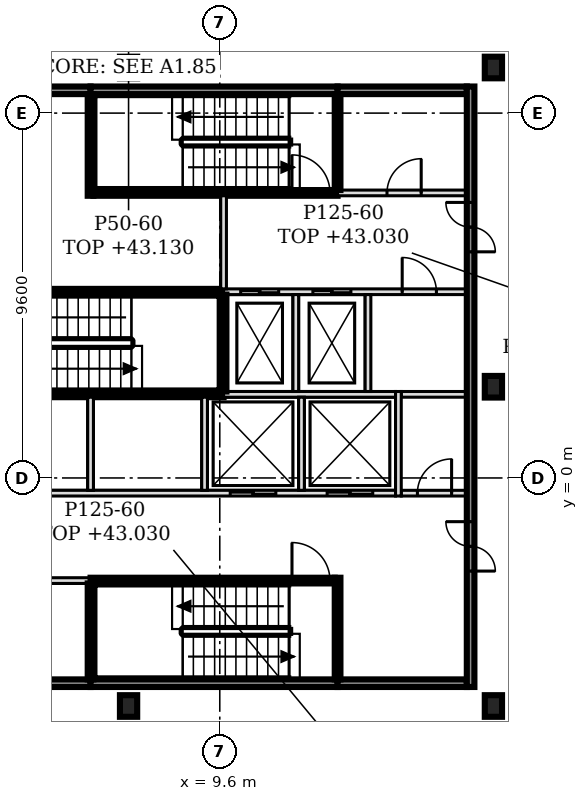
"""IFC4 building model, lengths in metres.
Left out: names, types, materials, properties, quantities, classifications, styles, units other than length and angle.
Written with IfcOpenShell. Run it as: python <this file> out.ifc"""

import sys

from ifc_helpers import new_model, si_unit, direction, frame, frame_2d, origin, origin_2d, place, context, subcontext, project, spatial, rectangle, i_section, extrude, element, fill, save


model = new_model("IFC4")
c1 = context("Model", 3, precision=1e-05, world=origin(), true_north=direction((0.0, 1.0)))
c2 = subcontext(c1, "Body", "Model", "MODEL_VIEW")
j1 = project(units=[si_unit("LENGTHUNIT", "METRE"), si_unit("PLANEANGLEUNIT", "RADIAN")], contexts=[c1])
p1 = place(None, origin())
s1 = spatial("IfcSite", under=j1, at=p1, CompositionType="ELEMENT")
p2 = place(p1, origin())
s2 = spatial("IfcBuilding", under=s1, at=p2, CompositionType="ELEMENT")
p3 = place(p2, frame((0.0, 0.0, 40.2)))
s3 = spatial("IfcBuildingStorey", under=s2, at=p3, CompositionType="ELEMENT", Elevation=40.2)
for number, where, z_axis, x_axis in (
    (1, (7.2, -6.0, -0.15), (0.0, 0.0, 1.0), (1.0, 0.0, 0.0)),
    (2, (16.8, -6.0, -0.15), (0.0, 0.0, 1.0), (1.0, 0.0, 0.0)),
    (3, (16.8, 2.4, -0.15), (0.0, 0.0, 1.0), (1.0, 0.0, 0.0)),
    (4, (7.2, 10.8, -0.15), (0.0, 0.0, 1.0), (1.0, 0.0, 0.0)),
    (5, (16.8, 10.8, -0.15), (0.0, 0.0, 1.0), (1.0, 0.0, 0.0)),
):
    element("IfcColumn", number, at=place(p3, frame(where, z_axis=z_axis, x_axis=x_axis)), inside=s3, PredefinedType="COLUMN", context=c2, shape_type="SweptSolid", body=[
        extrude(i_section(OverallWidth=0.454, OverallDepth=0.569, WebThickness=0.078, FlangeThickness=0.125, FilletRadius=0.015, at=origin_2d()), origin(), (0.0, 0.0, 1.0), 3.6),
    ])
p4 = place(p3, frame((-1.7, -5.4, 0.0), z_axis=(0.0, 0.0, 1.0), x_axis=(1.0, 0.0, 0.0)))
e6 = element("IfcWall", 6, at=p4, inside=s3, PredefinedType="SOLIDWALL", context=c2, shape_type="SweptSolid", body=[
    extrude(rectangle(XDim=7.9, YDim=0.2, at=frame_2d((3.95, 0.0))), origin(), (0.0, 0.0, 1.0), 3.45),
])
p5 = place(p3, frame((6.2, -5.4, 0.0), z_axis=(0.0, 0.0, 1.0), x_axis=(1.0, 0.0, 0.0)))
e7 = element("IfcWall", 7, at=p5, inside=s3, PredefinedType="SOLIDWALL", context=c2, shape_type="SweptSolid", body=[
    extrude(rectangle(XDim=6.5, YDim=0.2, at=frame_2d((3.25, 0.0))), origin(), (0.0, 0.0, 1.0), 3.45),
])
p6 = place(p3, frame((12.7, -5.4, 0.0), z_axis=(0.0, 0.0, 1.0), x_axis=(1.0, 0.0, 0.0)))
e8 = element("IfcWall", 8, at=p6, inside=s3, PredefinedType="SOLIDWALL", context=c2, shape_type="SweptSolid", body=[
    extrude(rectangle(XDim=3.4, YDim=0.2, at=frame_2d((1.7, 0.0))), origin(), (0.0, 0.0, 1.0), 3.45),
])
p7 = place(p3, frame((-1.7, -2.7, 0.0), z_axis=(0.0, 0.0, 1.0), x_axis=(1.0, 0.0, 0.0)))
e9 = element("IfcWall", 9, at=p7, inside=s3, PredefinedType="SOLIDWALL", context=c2, shape_type="SweptSolid", body=[
    extrude(rectangle(XDim=7.9, YDim=0.15, at=frame_2d((3.95, 0.0))), origin(), (0.0, 0.0, 1.0), 3.45),
])
p8 = place(p7, frame((0.6, 0.0, 0.0)))
e10 = element("IfcOpeningElement", 10, at=p8, cuts=e9, PredefinedType="OPENING", context=c2, shape_type="SweptSolid", body=[
    extrude(rectangle(XDim=1.1, YDim=2.1, at=frame_2d((0.55, 1.05))), frame((0.0, 0.085, 0.0), z_axis=(0.0, -1.0, 0.0), x_axis=(1.0, 0.0, 0.0)), (0.0, 0.0, 1.0), 0.17),
])
p9 = place(p7, frame((3.1, 0.0, 0.0)))
e11 = element("IfcOpeningElement", 11, at=p9, cuts=e9, PredefinedType="OPENING", context=c2, shape_type="SweptSolid", body=[
    extrude(rectangle(XDim=1.1, YDim=2.1, at=frame_2d((0.55, 1.05))), frame((0.0, 0.085, 0.0), z_axis=(0.0, -1.0, 0.0), x_axis=(1.0, 0.0, 0.0)), (0.0, 0.0, 1.0), 0.17),
])
p10 = place(p3, frame((6.2, -2.7, 0.0), z_axis=(0.0, 0.0, 1.0), x_axis=(1.0, 0.0, 0.0)))
e12 = element("IfcWall", 12, at=p10, inside=s3, PredefinedType="SOLIDWALL", context=c2, shape_type="SweptSolid", body=[
    extrude(rectangle(XDim=6.425, YDim=0.15, at=frame_2d((3.212, 0.0))), origin(), (0.0, 0.0, 1.0), 3.45),
])
p11 = place(p10, frame((5.3, 0.0, 0.0)))
e13 = element("IfcOpeningElement", 13, at=p11, cuts=e12, PredefinedType="OPENING", context=c2, shape_type="SweptSolid", body=[
    extrude(rectangle(XDim=1.0, YDim=2.1, at=frame_2d((0.5, 1.05))), frame((0.0, 0.085, 0.0), z_axis=(0.0, -1.0, 0.0), x_axis=(1.0, 0.0, 0.0)), (0.0, 0.0, 1.0), 0.17),
])
p12 = place(p3, frame((-1.7, -0.4, 0.0), z_axis=(0.0, 0.0, 1.0), x_axis=(1.0, 0.0, 0.0)))
e14 = element("IfcWall", 14, at=p12, inside=s3, PredefinedType="SOLIDWALL", context=c2, shape_type="SweptSolid", body=[
    extrude(rectangle(XDim=15.925, YDim=0.15, at=frame_2d((7.962, 0.0))), origin(), (0.0, 0.0, 1.0), 3.45),
])
p13 = place(p12, frame((0.6, 0.0, 0.0)))
e15 = element("IfcOpeningElement", 15, at=p13, cuts=e14, PredefinedType="OPENING", context=c2, shape_type="SweptSolid", body=[
    extrude(rectangle(XDim=1.1, YDim=2.1, at=frame_2d((0.55, 1.05))), frame((0.0, 0.085, 0.0), z_axis=(0.0, -1.0, 0.0), x_axis=(1.0, 0.0, 0.0)), (0.0, 0.0, 1.0), 0.17),
])
p14 = place(p12, frame((3.1, 0.0, 0.0)))
e16 = element("IfcOpeningElement", 16, at=p14, cuts=e14, PredefinedType="OPENING", context=c2, shape_type="SweptSolid", body=[
    extrude(rectangle(XDim=1.1, YDim=2.1, at=frame_2d((0.55, 1.05))), frame((0.0, 0.085, 0.0), z_axis=(0.0, -1.0, 0.0), x_axis=(1.0, 0.0, 0.0)), (0.0, 0.0, 1.0), 0.17),
])
p15 = place(p12, frame((11.575, 0.0, 0.0)))
e17 = element("IfcOpeningElement", 17, at=p15, cuts=e14, PredefinedType="OPENING", context=c2, shape_type="SweptSolid", body=[
    extrude(rectangle(XDim=1.2, YDim=2.1, at=frame_2d((0.6, 1.05))), frame((0.0, 0.085, 0.0), z_axis=(0.0, -1.0, 0.0), x_axis=(1.0, 0.0, 0.0)), (0.0, 0.0, 1.0), 0.17),
])
p16 = place(p12, frame((14.125, 0.0, 0.0)))
e18 = element("IfcOpeningElement", 18, at=p16, cuts=e14, PredefinedType="OPENING", context=c2, shape_type="SweptSolid", body=[
    extrude(rectangle(XDim=1.2, YDim=2.1, at=frame_2d((0.6, 1.05))), frame((0.0, 0.085, 0.0), z_axis=(0.0, -1.0, 0.0), x_axis=(1.0, 0.0, 0.0)), (0.0, 0.0, 1.0), 0.17),
])
p17 = place(p3, frame((14.375, -0.4, 0.0), z_axis=(0.0, 0.0, 1.0), x_axis=(1.0, 0.0, 0.0)))
e19 = element("IfcWall", 19, at=p17, inside=s3, PredefinedType="PARTITIONING", context=c2, shape_type="SweptSolid", body=[
    extrude(rectangle(XDim=1.725, YDim=0.15, at=frame_2d((0.863, 0.0))), origin(), (0.0, 0.0, 1.0), 3.45),
])
p18 = place(p17, frame((0.425, 0.0, 0.0)))
e20 = element("IfcOpeningElement", 20, at=p18, cuts=e19, PredefinedType="OPENING", context=c2, shape_type="SweptSolid", body=[
    extrude(rectangle(XDim=0.9, YDim=2.1, at=frame_2d((0.45, 1.05))), frame((0.0, 0.085, 0.0), z_axis=(0.0, -1.0, 0.0), x_axis=(1.0, 0.0, 0.0)), (0.0, 0.0, 1.0), 0.17),
])
p19 = place(p3, frame((3.2, 2.2, 0.0), z_axis=(0.0, 0.0, 1.0), x_axis=(1.0, 0.0, 0.0)))
e21 = element("IfcWall", 21, at=p19, inside=s3, PredefinedType="SOLIDWALL", context=c2, shape_type="SweptSolid", body=[
    extrude(rectangle(XDim=6.5, YDim=0.15, at=frame_2d((3.25, 0.0))), origin(), (0.0, 0.0, 1.0), 3.45),
])
p20 = place(p3, frame((9.7, 2.2, 0.0), z_axis=(0.0, 0.0, 1.0), x_axis=(1.0, 0.0, 0.0)))
e22 = element("IfcWall", 22, at=p20, inside=s3, PredefinedType="SOLIDWALL", context=c2, shape_type="SweptSolid", body=[
    extrude(rectangle(XDim=4.525, YDim=0.15, at=frame_2d((2.263, 0.0))), origin(), (0.0, 0.0, 1.0), 3.45),
])
p21 = place(p3, frame((14.375, 2.2, 0.0), z_axis=(0.0, 0.0, 1.0), x_axis=(1.0, 0.0, 0.0)))
e23 = element("IfcWall", 23, at=p21, inside=s3, PredefinedType="PARTITIONING", context=c2, shape_type="SweptSolid", body=[
    extrude(rectangle(XDim=1.725, YDim=0.15, at=frame_2d((0.863, 0.0))), origin(), (0.0, 0.0, 1.0), 3.45),
])
p22 = place(p3, frame((3.275, 4.9, 0.0), z_axis=(0.0, 0.0, 1.0), x_axis=(1.0, 0.0, 0.0)))
e24 = element("IfcWall", 24, at=p22, inside=s3, PredefinedType="SOLIDWALL", context=c2, shape_type="SweptSolid", body=[
    extrude(rectangle(XDim=6.425, YDim=0.15, at=frame_2d((3.212, 0.0))), origin(), (0.0, 0.0, 1.0), 3.45),
])
p23 = place(p22, frame((0.1, 0.0, 0.0)))
e25 = element("IfcOpeningElement", 25, at=p23, cuts=e24, PredefinedType="OPENING", context=c2, shape_type="SweptSolid", body=[
    extrude(rectangle(XDim=1.0, YDim=2.1, at=frame_2d((0.5, 1.05))), frame((0.0, 0.085, 0.0), z_axis=(0.0, -1.0, 0.0), x_axis=(1.0, 0.0, 0.0)), (0.0, 0.0, 1.0), 0.17),
])
p24 = place(p3, frame((9.7, 4.9, 0.0), z_axis=(0.0, 0.0, 1.0), x_axis=(1.0, 0.0, 0.0)))
e26 = element("IfcWall", 26, at=p24, inside=s3, PredefinedType="SOLIDWALL", context=c2, shape_type="SweptSolid", body=[
    extrude(rectangle(XDim=6.4, YDim=0.15, at=frame_2d((3.2, 0.0))), origin(), (0.0, 0.0, 1.0), 3.45),
])
p25 = place(p24, frame((0.45, 0.0, 0.0)))
e27 = element("IfcOpeningElement", 27, at=p25, cuts=e26, PredefinedType="OPENING", context=c2, shape_type="SweptSolid", body=[
    extrude(rectangle(XDim=1.0, YDim=2.1, at=frame_2d((0.5, 1.05))), frame((0.0, 0.085, 0.0), z_axis=(0.0, -1.0, 0.0), x_axis=(1.0, 0.0, 0.0)), (0.0, 0.0, 1.0), 0.17),
])
p26 = place(p24, frame((2.35, 0.0, 0.0)))
e28 = element("IfcOpeningElement", 28, at=p26, cuts=e26, PredefinedType="OPENING", context=c2, shape_type="SweptSolid", body=[
    extrude(rectangle(XDim=1.0, YDim=2.1, at=frame_2d((0.5, 1.05))), frame((0.0, 0.085, 0.0), z_axis=(0.0, -1.0, 0.0), x_axis=(1.0, 0.0, 0.0)), (0.0, 0.0, 1.0), 0.17),
])
p27 = place(p24, frame((4.7, 0.0, 0.0)))
e29 = element("IfcOpeningElement", 29, at=p27, cuts=e26, PredefinedType="OPENING", context=c2, shape_type="SweptSolid", body=[
    extrude(rectangle(XDim=0.9, YDim=2.1, at=frame_2d((0.45, 1.05))), frame((0.0, 0.085, 0.0), z_axis=(0.0, -1.0, 0.0), x_axis=(1.0, 0.0, 0.0)), (0.0, 0.0, 1.0), 0.17),
])
p28 = place(p3, frame((6.275, 7.5, 0.0), z_axis=(0.0, 0.0, 1.0), x_axis=(1.0, 0.0, 0.0)))
e30 = element("IfcWall", 30, at=p28, inside=s3, PredefinedType="SOLIDWALL", context=c2, shape_type="SweptSolid", body=[
    extrude(rectangle(XDim=6.425, YDim=0.15, at=frame_2d((3.212, 0.0))), origin(), (0.0, 0.0, 1.0), 3.45),
])
p29 = place(p28, frame((5.225, 0.0, 0.0)))
e31 = element("IfcOpeningElement", 31, at=p29, cuts=e30, PredefinedType="OPENING", context=c2, shape_type="SweptSolid", body=[
    extrude(rectangle(XDim=1.0, YDim=2.1, at=frame_2d((0.5, 1.05))), frame((0.0, 0.085, 0.0), z_axis=(0.0, -1.0, 0.0), x_axis=(1.0, 0.0, 0.0)), (0.0, 0.0, 1.0), 0.17),
])
p30 = place(p3, frame((12.7, 7.5, 0.0), z_axis=(0.0, 0.0, 1.0), x_axis=(1.0, 0.0, 0.0)))
e32 = element("IfcWall", 32, at=p30, inside=s3, PredefinedType="SOLIDWALL", context=c2, shape_type="SweptSolid", body=[
    extrude(rectangle(XDim=3.4, YDim=0.15, at=frame_2d((1.7, 0.0))), origin(), (0.0, 0.0, 1.0), 3.45),
])
p31 = place(p30, frame((1.3, 0.0, 0.0)))
e33 = element("IfcOpeningElement", 33, at=p31, cuts=e32, PredefinedType="OPENING", context=c2, shape_type="SweptSolid", body=[
    extrude(rectangle(XDim=0.9, YDim=2.1, at=frame_2d((0.45, 1.05))), frame((0.0, 0.085, 0.0), z_axis=(0.0, -1.0, 0.0), x_axis=(1.0, 0.0, 0.0)), (0.0, 0.0, 1.0), 0.17),
])
p32 = place(p3, frame((-1.7, 10.2, 0.0), z_axis=(0.0, 0.0, 1.0), x_axis=(1.0, 0.0, 0.0)))
e34 = element("IfcWall", 34, at=p32, inside=s3, PredefinedType="SOLIDWALL", context=c2, shape_type="SweptSolid", body=[
    extrude(rectangle(XDim=7.9, YDim=0.2, at=frame_2d((3.95, 0.0))), origin(), (0.0, 0.0, 1.0), 3.45),
])
p33 = place(p3, frame((6.2, 10.2, 0.0), z_axis=(0.0, 0.0, 1.0), x_axis=(1.0, 0.0, 0.0)))
e35 = element("IfcWall", 35, at=p33, inside=s3, PredefinedType="SOLIDWALL", context=c2, shape_type="SweptSolid", body=[
    extrude(rectangle(XDim=6.5, YDim=0.2, at=frame_2d((3.25, 0.0))), origin(), (0.0, 0.0, 1.0), 3.45),
])
p34 = place(p3, frame((12.7, 10.2, 0.0), z_axis=(0.0, 0.0, 1.0), x_axis=(1.0, 0.0, 0.0)))
e36 = element("IfcWall", 36, at=p34, inside=s3, PredefinedType="SOLIDWALL", context=c2, shape_type="SweptSolid", body=[
    extrude(rectangle(XDim=3.4, YDim=0.2, at=frame_2d((1.7, 0.0))), origin(), (0.0, 0.0, 1.0), 3.45),
])
p35 = place(p3, frame((6.2, -5.3, 0.0), z_axis=(0.0, 0.0, 1.0), x_axis=(0.0, 1.0, 0.0)))
e37 = element("IfcWall", 37, at=p35, inside=s3, PredefinedType="SOLIDWALL", context=c2, shape_type="SweptSolid", body=[
    extrude(rectangle(XDim=2.525, YDim=0.15, at=frame_2d((1.263, 0.0))), origin(), (0.0, 0.0, 1.0), 3.45),
])
p36 = place(p3, frame((6.2, -0.325, 0.0), z_axis=(0.0, 0.0, 1.0), x_axis=(0.0, 1.0, 0.0)))
e38 = element("IfcWall", 38, at=p36, inside=s3, PredefinedType="SOLIDWALL", context=c2, shape_type="SweptSolid", body=[
    extrude(rectangle(XDim=2.45, YDim=0.15, at=frame_2d((1.225, 0.0))), origin(), (0.0, 0.0, 1.0), 3.45),
])
p37 = place(p3, frame((6.2, 7.425, 0.0), z_axis=(0.0, 0.0, 1.0), x_axis=(0.0, 1.0, 0.0)))
e39 = element("IfcWall", 39, at=p37, inside=s3, PredefinedType="SOLIDWALL", context=c2, shape_type="SweptSolid", body=[
    extrude(rectangle(XDim=2.675, YDim=0.15, at=frame_2d((1.337, 0.0))), origin(), (0.0, 0.0, 1.0), 3.45),
])
p38 = place(p3, frame((9.2, -0.325, 0.0), z_axis=(0.0, 0.0, 1.0), x_axis=(0.0, 1.0, 0.0)))
e40 = element("IfcWall", 40, at=p38, inside=s3, PredefinedType="SOLIDWALL", context=c2, shape_type="SweptSolid", body=[
    extrude(rectangle(XDim=2.45, YDim=0.15, at=frame_2d((1.225, 0.0))), origin(), (0.0, 0.0, 1.0), 3.45),
])
p39 = place(p3, frame((9.7, 2.275, 0.0), z_axis=(0.0, 0.0, 1.0), x_axis=(0.0, 1.0, 0.0)))
e41 = element("IfcWall", 41, at=p39, inside=s3, PredefinedType="SOLIDWALL", context=c2, shape_type="SweptSolid", body=[
    extrude(rectangle(XDim=2.55, YDim=0.15, at=frame_2d((1.275, 0.0))), origin(), (0.0, 0.0, 1.0), 3.45),
])
p40 = place(p3, frame((9.7, 4.975, 0.0), z_axis=(0.0, 0.0, 1.0), x_axis=(0.0, 1.0, 0.0)))
e42 = element("IfcWall", 42, at=p40, inside=s3, PredefinedType="SOLIDWALL", context=c2, shape_type="SweptSolid", body=[
    extrude(rectangle(XDim=2.45, YDim=0.15, at=frame_2d((1.225, 0.0))), origin(), (0.0, 0.0, 1.0), 3.45),
])
p41 = place(p3, frame((11.6, 2.275, 0.0), z_axis=(0.0, 0.0, 1.0), x_axis=(0.0, 1.0, 0.0)))
e43 = element("IfcWall", 43, at=p41, inside=s3, PredefinedType="SOLIDWALL", context=c2, shape_type="SweptSolid", body=[
    extrude(rectangle(XDim=2.55, YDim=0.15, at=frame_2d((1.275, 0.0))), origin(), (0.0, 0.0, 1.0), 3.45),
])
p42 = place(p3, frame((11.75, -0.325, 0.0), z_axis=(0.0, 0.0, 1.0), x_axis=(0.0, 1.0, 0.0)))
e44 = element("IfcWall", 44, at=p42, inside=s3, PredefinedType="SOLIDWALL", context=c2, shape_type="SweptSolid", body=[
    extrude(rectangle(XDim=2.45, YDim=0.15, at=frame_2d((1.225, 0.0))), origin(), (0.0, 0.0, 1.0), 3.45),
])
p43 = place(p3, frame((12.7, -5.3, 0.0), z_axis=(0.0, 0.0, 1.0), x_axis=(0.0, 1.0, 0.0)))
e45 = element("IfcWall", 45, at=p43, inside=s3, PredefinedType="SOLIDWALL", context=c2, shape_type="SweptSolid", body=[
    extrude(rectangle(XDim=2.675, YDim=0.15, at=frame_2d((1.337, 0.0))), origin(), (0.0, 0.0, 1.0), 3.45),
])
p44 = place(p3, frame((12.7, 7.575, 0.0), z_axis=(0.0, 0.0, 1.0), x_axis=(0.0, 1.0, 0.0)))
e46 = element("IfcWall", 46, at=p44, inside=s3, PredefinedType="SOLIDWALL", context=c2, shape_type="SweptSolid", body=[
    extrude(rectangle(XDim=2.525, YDim=0.15, at=frame_2d((1.263, 0.0))), origin(), (0.0, 0.0, 1.0), 3.45),
])
p45 = place(p3, frame((13.5, 2.275, 0.0), z_axis=(0.0, 0.0, 1.0), x_axis=(0.0, 1.0, 0.0)))
e47 = element("IfcWall", 47, at=p45, inside=s3, PredefinedType="SOLIDWALL", context=c2, shape_type="SweptSolid", body=[
    extrude(rectangle(XDim=2.55, YDim=0.15, at=frame_2d((1.275, 0.0))), origin(), (0.0, 0.0, 1.0), 3.45),
])
p46 = place(p3, frame((14.3, -0.475, 0.0), z_axis=(0.0, 0.0, 1.0), x_axis=(0.0, 1.0, 0.0)))
e48 = element("IfcWall", 48, at=p46, inside=s3, PredefinedType="SOLIDWALL", context=c2, shape_type="SweptSolid", body=[
    extrude(rectangle(XDim=2.75, YDim=0.15, at=frame_2d((1.375, 0.0))), origin(), (0.0, 0.0, 1.0), 3.45),
])
p47 = place(p3, frame((16.2, -5.5, 0.0), z_axis=(0.0, 0.0, 1.0), x_axis=(0.0, 1.0, 0.0)))
e49 = element("IfcWall", 49, at=p47, inside=s3, PredefinedType="SOLIDWALL", context=c2, shape_type="SweptSolid", body=[
    extrude(rectangle(XDim=15.8, YDim=0.2, at=frame_2d((7.9, 0.0))), origin(), (0.0, 0.0, 1.0), 3.45),
])
p48 = place(p47, frame((3.05, 0.0, 0.0)))
e50 = element("IfcOpeningElement", 50, at=p48, cuts=e49, PredefinedType="OPENING", context=c2, shape_type="SweptSolid", body=[
    extrude(rectangle(XDim=1.3, YDim=2.1, at=frame_2d((0.65, 1.05))), frame((0.0, 0.11, 0.0), z_axis=(0.0, -1.0, 0.0), x_axis=(1.0, 0.0, 0.0)), (0.0, 0.0, 1.0), 0.22),
])
p49 = place(p47, frame((11.45, 0.0, 0.0)))
e51 = element("IfcOpeningElement", 51, at=p49, cuts=e49, PredefinedType="OPENING", context=c2, shape_type="SweptSolid", body=[
    extrude(rectangle(XDim=1.3, YDim=2.1, at=frame_2d((0.65, 1.05))), frame((0.0, 0.11, 0.0), z_axis=(0.0, -1.0, 0.0), x_axis=(1.0, 0.0, 0.0)), (0.0, 0.0, 1.0), 0.22),
])
p50 = place(p15, origin())
e52 = element("IfcDoor", 52, at=p50, inside=s3, OperationType="DOUBLE_DOOR_SLIDING", PredefinedType="DOOR", context=c2, shape_type="SweptSolid", body=[
    extrude(rectangle(XDim=1.2, YDim=2.1, at=frame_2d((0.6, 1.05))), frame((0.0, 0.025, 0.0), z_axis=(0.0, -1.0, 0.0), x_axis=(1.0, 0.0, 0.0)), (0.0, 0.0, 1.0), 0.05),
])
fill(e17, e52)
p51 = place(p16, origin())
e53 = element("IfcDoor", 53, at=p51, inside=s3, OperationType="DOUBLE_DOOR_SLIDING", PredefinedType="DOOR", context=c2, shape_type="SweptSolid", body=[
    extrude(rectangle(XDim=1.2, YDim=2.1, at=frame_2d((0.6, 1.05))), frame((0.0, 0.025, 0.0), z_axis=(0.0, -1.0, 0.0), x_axis=(1.0, 0.0, 0.0)), (0.0, 0.0, 1.0), 0.05),
])
fill(e18, e53)
p52 = place(p25, origin())
e54 = element("IfcDoor", 54, at=p52, inside=s3, OperationType="DOUBLE_DOOR_SLIDING", PredefinedType="DOOR", context=c2, shape_type="SweptSolid", body=[
    extrude(rectangle(XDim=1.0, YDim=2.1, at=frame_2d((0.5, 1.05))), frame((0.0, 0.025, 0.0), z_axis=(0.0, -1.0, 0.0), x_axis=(1.0, 0.0, 0.0)), (0.0, 0.0, 1.0), 0.05),
])
fill(e27, e54)
p53 = place(p26, origin())
e55 = element("IfcDoor", 55, at=p53, inside=s3, OperationType="DOUBLE_DOOR_SLIDING", PredefinedType="DOOR", context=c2, shape_type="SweptSolid", body=[
    extrude(rectangle(XDim=1.0, YDim=2.1, at=frame_2d((0.5, 1.05))), frame((0.0, 0.025, 0.0), z_axis=(0.0, -1.0, 0.0), x_axis=(1.0, 0.0, 0.0)), (0.0, 0.0, 1.0), 0.05),
])
fill(e28, e55)
p54 = place(p11, origin())
e56 = element("IfcDoor", 56, at=p54, inside=s3, OperationType="SINGLE_SWING_LEFT", PredefinedType="DOOR", context=c2, shape_type="SweptSolid", body=[
    extrude(rectangle(XDim=1.0, YDim=2.1, at=frame_2d((0.5, 1.05))), frame((0.0, 0.025, 0.0), z_axis=(0.0, -1.0, 0.0), x_axis=(1.0, 0.0, 0.0)), (0.0, 0.0, 1.0), 0.05),
])
fill(e13, e56)
p55 = place(p29, origin())
e57 = element("IfcDoor", 57, at=p55, inside=s3, OperationType="SINGLE_SWING_LEFT", PredefinedType="DOOR", context=c2, shape_type="SweptSolid", body=[
    extrude(rectangle(XDim=1.0, YDim=2.1, at=frame_2d((0.5, 1.05))), frame((0.0, 0.025, 0.0), z_axis=(0.0, -1.0, 0.0), x_axis=(1.0, 0.0, 0.0)), (0.0, 0.0, 1.0), 0.05),
])
fill(e31, e57)
p56 = place(p48, origin())
e58 = element("IfcDoor", 58, at=p56, inside=s3, OperationType="DOUBLE_DOOR_SINGLE_SWING", PredefinedType="DOOR", context=c2, shape_type="SweptSolid", body=[
    extrude(rectangle(XDim=1.3, YDim=2.1, at=frame_2d((0.65, 1.05))), frame((0.0, 0.025, 0.0), z_axis=(0.0, -1.0, 0.0), x_axis=(1.0, 0.0, 0.0)), (0.0, 0.0, 1.0), 0.05),
])
fill(e50, e58)
p57 = place(p49, origin())
e59 = element("IfcDoor", 59, at=p57, inside=s3, OperationType="DOUBLE_DOOR_SINGLE_SWING", PredefinedType="DOOR", context=c2, shape_type="SweptSolid", body=[
    extrude(rectangle(XDim=1.3, YDim=2.1, at=frame_2d((0.65, 1.05))), frame((0.0, 0.025, 0.0), z_axis=(0.0, -1.0, 0.0), x_axis=(1.0, 0.0, 0.0)), (0.0, 0.0, 1.0), 0.05),
])
fill(e51, e59)
p58 = place(p18, origin())
e60 = element("IfcDoor", 60, at=p58, inside=s3, OperationType="SINGLE_SWING_RIGHT", PredefinedType="DOOR", context=c2, shape_type="SweptSolid", body=[
    extrude(rectangle(XDim=0.9, YDim=2.1, at=frame_2d((0.45, 1.05))), frame((0.0, 0.025, 0.0), z_axis=(0.0, -1.0, 0.0), x_axis=(1.0, 0.0, 0.0)), (0.0, 0.0, 1.0), 0.05),
])
fill(e20, e60)
p59 = place(p27, origin())
e61 = element("IfcDoor", 61, at=p59, inside=s3, OperationType="SINGLE_SWING_LEFT", PredefinedType="DOOR", context=c2, shape_type="SweptSolid", body=[
    extrude(rectangle(XDim=0.9, YDim=2.1, at=frame_2d((0.45, 1.05))), frame((0.0, 0.025, 0.0), z_axis=(0.0, -1.0, 0.0), x_axis=(1.0, 0.0, 0.0)), (0.0, 0.0, 1.0), 0.05),
])
fill(e29, e61)
p60 = place(p31, origin())
e62 = element("IfcDoor", 62, at=p60, inside=s3, OperationType="SINGLE_SWING_RIGHT", PredefinedType="DOOR", context=c2, shape_type="SweptSolid", body=[
    extrude(rectangle(XDim=0.9, YDim=2.1, at=frame_2d((0.45, 1.05))), frame((0.0, 0.025, 0.0), z_axis=(0.0, -1.0, 0.0), x_axis=(1.0, 0.0, 0.0)), (0.0, 0.0, 1.0), 0.05),
])
fill(e33, e62)
save(model, sys.argv[1])
